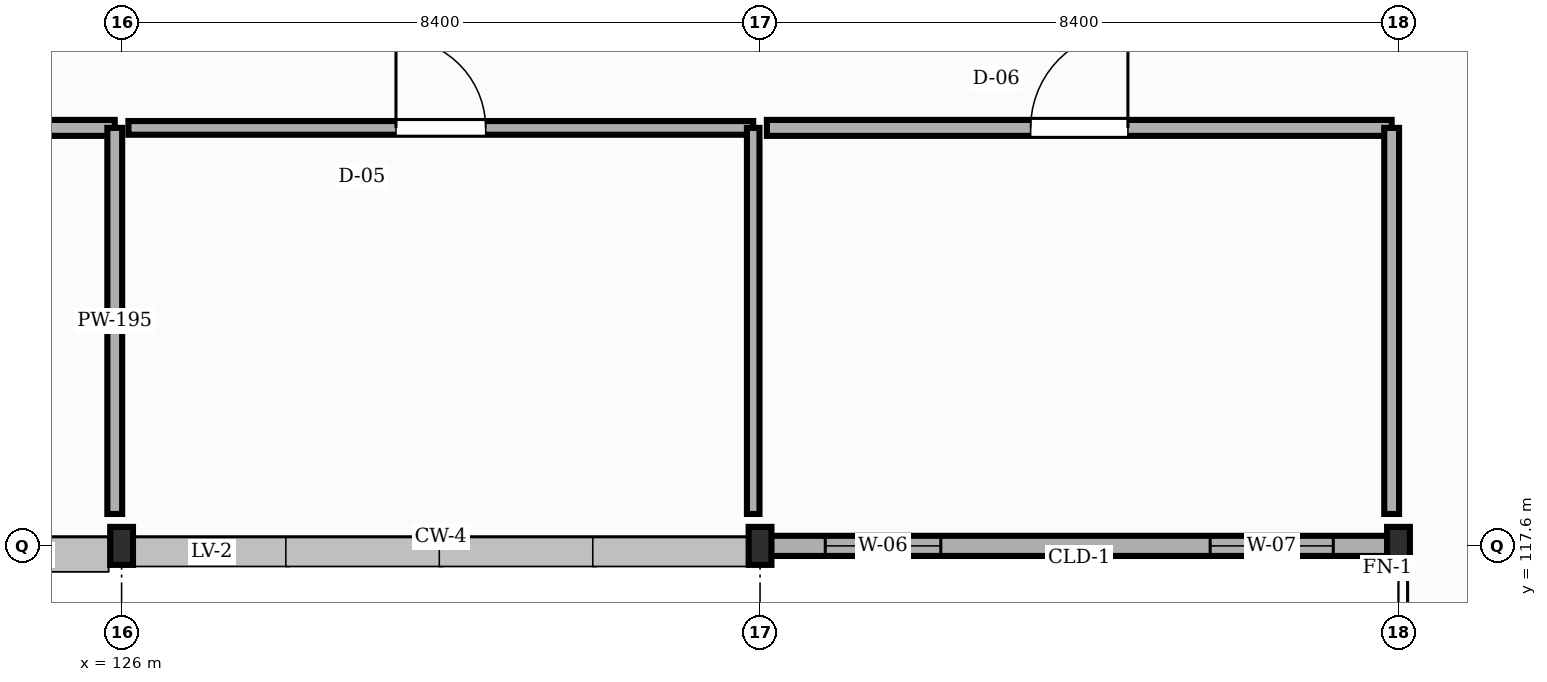
"""IFC4 building model, lengths in metres.
Left out: names, types, materials, properties, quantities, classifications, styles, units other than length and angle.
Written with IfcOpenShell. Run it as: python <this file> out.ifc"""

import sys

from ifc_helpers import new_model, si_unit, direction, frame, frame_2d, origin, origin_2d, place, context, subcontext, project, spatial, rectangle, i_section, extrude, element, fill, save


model = new_model("IFC4")
c1 = context("Model", 3, precision=1e-05, world=origin(), true_north=direction((0.0, 1.0)))
c2 = subcontext(c1, "Body", "Model", "MODEL_VIEW")
j1 = project(units=[si_unit("LENGTHUNIT", "METRE"), si_unit("PLANEANGLEUNIT", "RADIAN")], contexts=[c1])
p1 = place(None, origin())
s1 = spatial("IfcSite", under=j1, at=p1, CompositionType="ELEMENT")
p2 = place(p1, origin())
s2 = spatial("IfcBuilding", under=s1, at=p2, CompositionType="ELEMENT")
p3 = place(p2, frame((0.0, 0.0, 13.95)))
s3 = spatial("IfcBuildingStorey", under=s2, at=p3, CompositionType="ELEMENT", Elevation=13.95)
for number, where, z_axis, x_axis in (
    (1, (126.0, 117.6, 0.0), (0.0, 0.0, 1.0), (1.0, 0.0, 0.0)),
    (2, (134.4, 117.6, 0.0), (0.0, 0.0, 1.0), (1.0, 0.0, 0.0)),
    (3, (142.8, 117.6, 0.0), (0.0, 0.0, 1.0), (1.0, 0.0, 0.0)),
):
    element("IfcColumn", number, at=place(p3, frame(where, z_axis=z_axis, x_axis=x_axis)), inside=s3, PredefinedType="COLUMN", context=c2, shape_type="SweptSolid", body=[
        extrude(i_section(OverallWidth=0.3, OverallDepth=0.5, WebThickness=0.014, FlangeThickness=0.028, FilletRadius=0.027, at=origin_2d()), origin(), (0.0, 0.0, 1.0), 4.05),
    ])
p4 = place(p3, frame((134.408, 117.6, 0.0), z_axis=(0.0, 0.0, 1.0), x_axis=(1.0, 0.0, 0.0)))
e4 = element("IfcWall", 4, at=p4, inside=s3, PredefinedType="STANDARD", context=c2, shape_type="SweptSolid", body=[
    extrude(rectangle(XDim=8.384, YDim=0.265, at=frame_2d((4.192, 0.0))), origin(), (0.0, 0.0, 1.0), 3.487),
])
p5 = place(p4, frame((0.85, 0.0, 0.9)))
e5 = element("IfcOpeningElement", 5, at=p5, cuts=e4, PredefinedType="OPENING", context=c2, shape_type="SweptSolid", body=[
    extrude(rectangle(XDim=1.52, YDim=1.05, at=frame_2d((0.76, 0.525))), frame((0.0, 0.142, 0.0), z_axis=(0.0, -1.0, 0.0), x_axis=(1.0, 0.0, 0.0)), (0.0, 0.0, 1.0), 0.285),
])
p6 = place(p4, frame((5.914, 0.0, 0.9)))
e6 = element("IfcOpeningElement", 6, at=p6, cuts=e4, PredefinedType="OPENING", context=c2, shape_type="SweptSolid", body=[
    extrude(rectangle(XDim=1.62, YDim=1.05, at=frame_2d((0.81, 0.525))), frame((0.0, 0.142, 0.0), z_axis=(0.0, -1.0, 0.0), x_axis=(1.0, 0.0, 0.0)), (0.0, 0.0, 1.0), 0.285),
])
p7 = place(p3, frame((117.69, 123.1, -0.004), z_axis=(0.0, 0.0, 1.0), x_axis=(1.0, 0.0, 0.0)))
e7 = element("IfcWall", 7, at=p7, inside=s3, PredefinedType="STANDARD", context=c2, shape_type="SweptSolid", body=[
    extrude(rectangle(XDim=8.22, YDim=0.21, at=frame_2d((4.11, 0.0))), origin(), (0.0, 0.0, 1.0), 3.854),
])
p8 = place(p7, frame((3.56, 0.0, 0.0)))
e8 = element("IfcOpeningElement", 8, at=p8, cuts=e7, PredefinedType="OPENING", context=c2, shape_type="SweptSolid", body=[
    extrude(rectangle(XDim=1.1, YDim=2.06, at=frame_2d((0.55, 1.03))), frame((0.0, 0.115, 0.0), z_axis=(0.0, -1.0, 0.0), x_axis=(1.0, 0.0, 0.0)), (0.0, 0.0, 1.0), 0.23),
])
p9 = place(p3, frame((125.91, 123.1, -0.004), z_axis=(0.0, 0.0, 1.0), x_axis=(0.0, -1.0, 0.0)))
e9 = element("IfcWall", 9, at=p9, inside=s3, PredefinedType="STANDARD", context=c2, shape_type="SweptSolid", body=[
    extrude(rectangle(XDim=5.08, YDim=0.195, at=frame_2d((2.54, 0.0))), origin(), (0.0, 0.0, 1.0), 3.541),
])
p10 = place(p3, frame((126.09, 123.1, -0.004), z_axis=(0.0, 0.0, 1.0), x_axis=(1.0, 0.0, 0.0)))
e10 = element("IfcWall", 10, at=p10, inside=s3, PredefinedType="STANDARD", context=c2, shape_type="SweptSolid", body=[
    extrude(rectangle(XDim=8.22, YDim=0.18, at=frame_2d((4.11, 0.0))), origin(), (0.0, 0.0, 1.0), 3.854),
])
p11 = place(p10, frame((3.52, 0.0, 0.0)))
e11 = element("IfcOpeningElement", 11, at=p11, cuts=e10, PredefinedType="OPENING", context=c2, shape_type="SweptSolid", body=[
    extrude(rectangle(XDim=1.18, YDim=2.06, at=frame_2d((0.59, 1.03))), frame((0.0, 0.1, 0.0), z_axis=(0.0, -1.0, 0.0), x_axis=(1.0, 0.0, 0.0)), (0.0, 0.0, 1.0), 0.2),
])
p12 = place(p3, frame((134.31, 123.1, -0.004), z_axis=(0.0, 0.0, 1.0), x_axis=(0.0, -1.0, 0.0)))
e12 = element("IfcWall", 12, at=p12, inside=s3, PredefinedType="STANDARD", context=c2, shape_type="SweptSolid", body=[
    extrude(rectangle(XDim=5.08, YDim=0.165, at=frame_2d((2.54, 0.0))), origin(), (0.0, 0.0, 1.0), 3.251),
])
p13 = place(p3, frame((134.49, 123.1, -0.004), z_axis=(0.0, 0.0, 1.0), x_axis=(1.0, 0.0, 0.0)))
e13 = element("IfcWall", 13, at=p13, inside=s3, PredefinedType="STANDARD", context=c2, shape_type="SweptSolid", body=[
    extrude(rectangle(XDim=8.22, YDim=0.21, at=frame_2d((4.11, 0.0))), origin(), (0.0, 0.0, 1.0), 3.854),
])
p14 = place(p13, frame((3.47, 0.0, 0.0)))
e14 = element("IfcOpeningElement", 14, at=p14, cuts=e13, PredefinedType="OPENING", context=c2, shape_type="SweptSolid", body=[
    extrude(rectangle(XDim=1.28, YDim=2.06, at=frame_2d((0.64, 1.03))), frame((0.0, 0.115, 0.0), z_axis=(0.0, -1.0, 0.0), x_axis=(1.0, 0.0, 0.0)), (0.0, 0.0, 1.0), 0.23),
])
p15 = place(p3, frame((142.71, 123.1, -0.004), z_axis=(0.0, 0.0, 1.0), x_axis=(0.0, -1.0, 0.0)))
e15 = element("IfcWall", 15, at=p15, inside=s3, PredefinedType="STANDARD", context=c2, shape_type="SweptSolid", body=[
    extrude(rectangle(XDim=5.08, YDim=0.195, at=frame_2d((2.54, 0.0))), origin(), (0.0, 0.0, 1.0), 3.361),
])
p16 = place(p5, origin())
e16 = element("IfcWindow", 16, at=p16, inside=s3, PartitioningType="SINGLE_PANEL", PredefinedType="WINDOW", context=c2, shape_type="SweptSolid", body=[
    extrude(rectangle(XDim=1.52, YDim=1.05, at=frame_2d((0.76, 0.525))), frame((0.0, 0.03, 0.0), z_axis=(0.0, -1.0, 0.0), x_axis=(1.0, 0.0, 0.0)), (0.0, 0.0, 1.0), 0.06),
])
fill(e5, e16)
p17 = place(p6, origin())
e17 = element("IfcWindow", 17, at=p17, inside=s3, PartitioningType="SINGLE_PANEL", PredefinedType="WINDOW", context=c2, shape_type="SweptSolid", body=[
    extrude(rectangle(XDim=1.62, YDim=1.05, at=frame_2d((0.81, 0.525))), frame((0.0, 0.03, 0.0), z_axis=(0.0, -1.0, 0.0), x_axis=(1.0, 0.0, 0.0)), (0.0, 0.0, 1.0), 0.06),
])
fill(e6, e17)
p18 = place(p11, origin())
e18 = element("IfcDoor", 18, at=p18, inside=s3, OperationType="SINGLE_SWING_LEFT", PredefinedType="DOOR", context=c2, shape_type="SweptSolid", body=[
    extrude(rectangle(XDim=1.18, YDim=2.06, at=frame_2d((0.59, 1.03))), frame((0.0, 0.025, 0.0), z_axis=(0.0, -1.0, 0.0), x_axis=(1.0, 0.0, 0.0)), (0.0, 0.0, 1.0), 0.05),
])
fill(e11, e18)
p19 = place(p14, origin())
e19 = element("IfcDoor", 19, at=p19, inside=s3, OperationType="SINGLE_SWING_RIGHT", PredefinedType="DOOR", context=c2, shape_type="SweptSolid", body=[
    extrude(rectangle(XDim=1.28, YDim=2.06, at=frame_2d((0.64, 1.03))), frame((0.0, 0.025, 0.0), z_axis=(0.0, -1.0, 0.0), x_axis=(1.0, 0.0, 0.0)), (0.0, 0.0, 1.0), 0.05),
])
fill(e14, e19)
save(model, sys.argv[1])
